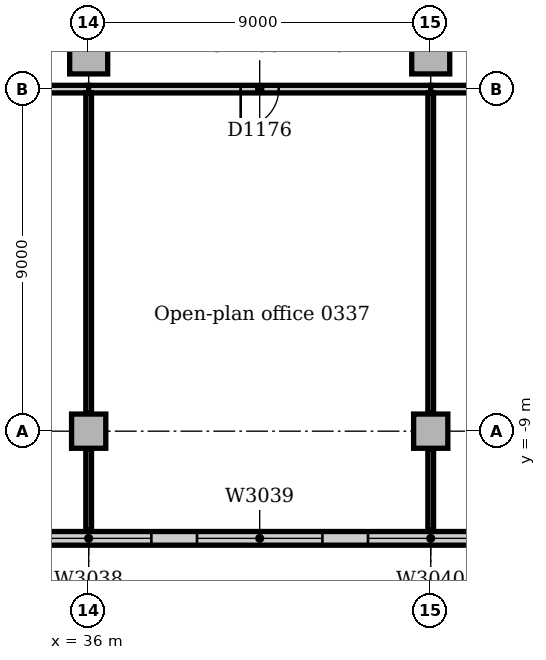
"""IFC4 building model, lengths in metres.
Left out: names, types, materials, properties, quantities, classifications, styles, units other than length and angle.
Written with IfcOpenShell. Run it as: python <this file> out.ifc"""

import sys

from ifc_helpers import new_model, si_unit, direction, frame, frame_2d, origin, origin_2d, place, context, subcontext, project, spatial, rectangle, extrude, element, fill, save


model = new_model("IFC4")
c1 = context("Model", 3, precision=1e-05, world=origin(), true_north=direction((0.0, 1.0)))
c2 = subcontext(c1, "Body", "Model", "MODEL_VIEW")
j1 = project(units=[si_unit("LENGTHUNIT", "METRE"), si_unit("PLANEANGLEUNIT", "RADIAN")], contexts=[c1])
p1 = place(None, origin())
s1 = spatial("IfcSite", under=j1, at=p1, CompositionType="ELEMENT")
p2 = place(p1, origin())
s2 = spatial("IfcBuilding", under=s1, at=p2, CompositionType="ELEMENT")
p3 = place(p2, frame((0.0, 0.0, 16.0)))
s3 = spatial("IfcBuildingStorey", under=s2, at=p3, CompositionType="ELEMENT", Elevation=16.0)
for number, where, z_axis, x_axis in (
    (1, (36.0, 0.9, 0.0), (0.0, 0.0, 1.0), (1.0, 0.0, 0.0)),
    (2, (45.0, 0.9, 0.0), (0.0, 0.0, 1.0), (1.0, 0.0, 0.0)),
):
    element("IfcColumn", number, at=place(p3, frame(where, z_axis=z_axis, x_axis=x_axis)), inside=s3, PredefinedType="COLUMN", context=c2, shape_type="SweptSolid", body=[
        extrude(rectangle(XDim=1.0, YDim=1.0, at=origin_2d()), origin(), (0.0, 0.0, 1.0), 4.7),
    ])
for number, where, z_axis, x_axis in (
    (3, (36.0, -9.0, 0.0), (0.0, 0.0, 1.0), (1.0, 0.0, 0.0)),
    (4, (45.0, -9.0, 0.0), (0.0, 0.0, 1.0), (1.0, 0.0, 0.0)),
):
    element("IfcColumn", number, at=place(p3, frame(where, z_axis=z_axis, x_axis=x_axis)), inside=s3, PredefinedType="COLUMN", context=c2, shape_type="SweptSolid", body=[
        extrude(rectangle(XDim=0.9, YDim=0.9, at=origin_2d()), origin(), (0.0, 0.0, 1.0), 4.7),
    ])
p4 = place(p3, frame((-81.0, -11.82, 0.0), z_axis=(0.0, 0.0, 1.0), x_axis=(1.0, 0.0, 0.0)))
e5 = element("IfcWall", 5, at=p4, inside=s3, PredefinedType="STANDARD", context=c2, shape_type="SweptSolid", body=[
    extrude(rectangle(XDim=144.0, YDim=0.36, at=frame_2d((72.0, 0.0))), origin(), (0.0, 0.0, 1.0), 4.7),
])
p5 = place(p4, frame((2.85, 0.0, 0.9)))
e6 = element("IfcOpeningElement", 6, at=p5, cuts=e5, PredefinedType="OPENING", context=c2, shape_type="SweptSolid", body=[
    extrude(rectangle(XDim=3.3, YDim=2.4, at=frame_2d((1.65, 1.2))), frame((0.0, 0.19, 0.0), z_axis=(0.0, -1.0, 0.0), x_axis=(1.0, 0.0, 0.0)), (0.0, 0.0, 1.0), 0.38),
])
p6 = place(p4, frame((7.35, 0.0, 0.9)))
e7 = element("IfcOpeningElement", 7, at=p6, cuts=e5, PredefinedType="OPENING", context=c2, shape_type="SweptSolid", body=[
    extrude(rectangle(XDim=3.3, YDim=2.4, at=frame_2d((1.65, 1.2))), frame((0.0, 0.19, 0.0), z_axis=(0.0, -1.0, 0.0), x_axis=(1.0, 0.0, 0.0)), (0.0, 0.0, 1.0), 0.38),
])
p7 = place(p4, frame((11.85, 0.0, 0.9)))
e8 = element("IfcOpeningElement", 8, at=p7, cuts=e5, PredefinedType="OPENING", context=c2, shape_type="SweptSolid", body=[
    extrude(rectangle(XDim=3.3, YDim=2.4, at=frame_2d((1.65, 1.2))), frame((0.0, 0.19, 0.0), z_axis=(0.0, -1.0, 0.0), x_axis=(1.0, 0.0, 0.0)), (0.0, 0.0, 1.0), 0.38),
])
p8 = place(p4, frame((16.35, 0.0, 0.9)))
e9 = element("IfcOpeningElement", 9, at=p8, cuts=e5, PredefinedType="OPENING", context=c2, shape_type="SweptSolid", body=[
    extrude(rectangle(XDim=3.3, YDim=2.4, at=frame_2d((1.65, 1.2))), frame((0.0, 0.19, 0.0), z_axis=(0.0, -1.0, 0.0), x_axis=(1.0, 0.0, 0.0)), (0.0, 0.0, 1.0), 0.38),
])
p9 = place(p4, frame((20.85, 0.0, 0.9)))
e10 = element("IfcOpeningElement", 10, at=p9, cuts=e5, PredefinedType="OPENING", context=c2, shape_type="SweptSolid", body=[
    extrude(rectangle(XDim=3.3, YDim=2.4, at=frame_2d((1.65, 1.2))), frame((0.0, 0.19, 0.0), z_axis=(0.0, -1.0, 0.0), x_axis=(1.0, 0.0, 0.0)), (0.0, 0.0, 1.0), 0.38),
])
p10 = place(p4, frame((25.35, 0.0, 0.9)))
e11 = element("IfcOpeningElement", 11, at=p10, cuts=e5, PredefinedType="OPENING", context=c2, shape_type="SweptSolid", body=[
    extrude(rectangle(XDim=3.3, YDim=2.4, at=frame_2d((1.65, 1.2))), frame((0.0, 0.19, 0.0), z_axis=(0.0, -1.0, 0.0), x_axis=(1.0, 0.0, 0.0)), (0.0, 0.0, 1.0), 0.38),
])
p11 = place(p4, frame((29.85, 0.0, 0.9)))
e12 = element("IfcOpeningElement", 12, at=p11, cuts=e5, PredefinedType="OPENING", context=c2, shape_type="SweptSolid", body=[
    extrude(rectangle(XDim=3.3, YDim=2.4, at=frame_2d((1.65, 1.2))), frame((0.0, 0.19, 0.0), z_axis=(0.0, -1.0, 0.0), x_axis=(1.0, 0.0, 0.0)), (0.0, 0.0, 1.0), 0.38),
])
p12 = place(p4, frame((34.35, 0.0, 0.9)))
e13 = element("IfcOpeningElement", 13, at=p12, cuts=e5, PredefinedType="OPENING", context=c2, shape_type="SweptSolid", body=[
    extrude(rectangle(XDim=3.3, YDim=2.4, at=frame_2d((1.65, 1.2))), frame((0.0, 0.19, 0.0), z_axis=(0.0, -1.0, 0.0), x_axis=(1.0, 0.0, 0.0)), (0.0, 0.0, 1.0), 0.38),
])
p13 = place(p4, frame((38.85, 0.0, 0.9)))
e14 = element("IfcOpeningElement", 14, at=p13, cuts=e5, PredefinedType="OPENING", context=c2, shape_type="SweptSolid", body=[
    extrude(rectangle(XDim=3.3, YDim=2.4, at=frame_2d((1.65, 1.2))), frame((0.0, 0.19, 0.0), z_axis=(0.0, -1.0, 0.0), x_axis=(1.0, 0.0, 0.0)), (0.0, 0.0, 1.0), 0.38),
])
p14 = place(p4, frame((43.35, 0.0, 0.9)))
e15 = element("IfcOpeningElement", 15, at=p14, cuts=e5, PredefinedType="OPENING", context=c2, shape_type="SweptSolid", body=[
    extrude(rectangle(XDim=3.3, YDim=2.4, at=frame_2d((1.65, 1.2))), frame((0.0, 0.19, 0.0), z_axis=(0.0, -1.0, 0.0), x_axis=(1.0, 0.0, 0.0)), (0.0, 0.0, 1.0), 0.38),
])
p15 = place(p4, frame((47.85, 0.0, 0.9)))
e16 = element("IfcOpeningElement", 16, at=p15, cuts=e5, PredefinedType="OPENING", context=c2, shape_type="SweptSolid", body=[
    extrude(rectangle(XDim=3.3, YDim=2.4, at=frame_2d((1.65, 1.2))), frame((0.0, 0.19, 0.0), z_axis=(0.0, -1.0, 0.0), x_axis=(1.0, 0.0, 0.0)), (0.0, 0.0, 1.0), 0.38),
])
p16 = place(p4, frame((52.35, 0.0, 0.9)))
e17 = element("IfcOpeningElement", 17, at=p16, cuts=e5, PredefinedType="OPENING", context=c2, shape_type="SweptSolid", body=[
    extrude(rectangle(XDim=3.3, YDim=2.4, at=frame_2d((1.65, 1.2))), frame((0.0, 0.19, 0.0), z_axis=(0.0, -1.0, 0.0), x_axis=(1.0, 0.0, 0.0)), (0.0, 0.0, 1.0), 0.38),
])
p17 = place(p4, frame((56.85, 0.0, 0.9)))
e18 = element("IfcOpeningElement", 18, at=p17, cuts=e5, PredefinedType="OPENING", context=c2, shape_type="SweptSolid", body=[
    extrude(rectangle(XDim=3.3, YDim=2.4, at=frame_2d((1.65, 1.2))), frame((0.0, 0.19, 0.0), z_axis=(0.0, -1.0, 0.0), x_axis=(1.0, 0.0, 0.0)), (0.0, 0.0, 1.0), 0.38),
])
p18 = place(p4, frame((61.35, 0.0, 0.9)))
e19 = element("IfcOpeningElement", 19, at=p18, cuts=e5, PredefinedType="OPENING", context=c2, shape_type="SweptSolid", body=[
    extrude(rectangle(XDim=3.3, YDim=2.4, at=frame_2d((1.65, 1.2))), frame((0.0, 0.19, 0.0), z_axis=(0.0, -1.0, 0.0), x_axis=(1.0, 0.0, 0.0)), (0.0, 0.0, 1.0), 0.38),
])
p19 = place(p4, frame((65.85, 0.0, 0.9)))
e20 = element("IfcOpeningElement", 20, at=p19, cuts=e5, PredefinedType="OPENING", context=c2, shape_type="SweptSolid", body=[
    extrude(rectangle(XDim=3.3, YDim=2.4, at=frame_2d((1.65, 1.2))), frame((0.0, 0.19, 0.0), z_axis=(0.0, -1.0, 0.0), x_axis=(1.0, 0.0, 0.0)), (0.0, 0.0, 1.0), 0.38),
])
p20 = place(p4, frame((70.35, 0.0, 0.9)))
e21 = element("IfcOpeningElement", 21, at=p20, cuts=e5, PredefinedType="OPENING", context=c2, shape_type="SweptSolid", body=[
    extrude(rectangle(XDim=3.3, YDim=2.4, at=frame_2d((1.65, 1.2))), frame((0.0, 0.19, 0.0), z_axis=(0.0, -1.0, 0.0), x_axis=(1.0, 0.0, 0.0)), (0.0, 0.0, 1.0), 0.38),
])
p21 = place(p4, frame((74.85, 0.0, 0.9)))
e22 = element("IfcOpeningElement", 22, at=p21, cuts=e5, PredefinedType="OPENING", context=c2, shape_type="SweptSolid", body=[
    extrude(rectangle(XDim=3.3, YDim=2.4, at=frame_2d((1.65, 1.2))), frame((0.0, 0.19, 0.0), z_axis=(0.0, -1.0, 0.0), x_axis=(1.0, 0.0, 0.0)), (0.0, 0.0, 1.0), 0.38),
])
p22 = place(p4, frame((79.35, 0.0, 0.9)))
e23 = element("IfcOpeningElement", 23, at=p22, cuts=e5, PredefinedType="OPENING", context=c2, shape_type="SweptSolid", body=[
    extrude(rectangle(XDim=3.3, YDim=2.4, at=frame_2d((1.65, 1.2))), frame((0.0, 0.19, 0.0), z_axis=(0.0, -1.0, 0.0), x_axis=(1.0, 0.0, 0.0)), (0.0, 0.0, 1.0), 0.38),
])
p23 = place(p4, frame((83.85, 0.0, 0.9)))
e24 = element("IfcOpeningElement", 24, at=p23, cuts=e5, PredefinedType="OPENING", context=c2, shape_type="SweptSolid", body=[
    extrude(rectangle(XDim=3.3, YDim=2.4, at=frame_2d((1.65, 1.2))), frame((0.0, 0.19, 0.0), z_axis=(0.0, -1.0, 0.0), x_axis=(1.0, 0.0, 0.0)), (0.0, 0.0, 1.0), 0.38),
])
p24 = place(p4, frame((88.35, 0.0, 0.9)))
e25 = element("IfcOpeningElement", 25, at=p24, cuts=e5, PredefinedType="OPENING", context=c2, shape_type="SweptSolid", body=[
    extrude(rectangle(XDim=3.3, YDim=2.4, at=frame_2d((1.65, 1.2))), frame((0.0, 0.19, 0.0), z_axis=(0.0, -1.0, 0.0), x_axis=(1.0, 0.0, 0.0)), (0.0, 0.0, 1.0), 0.38),
])
p25 = place(p4, frame((92.85, 0.0, 0.9)))
e26 = element("IfcOpeningElement", 26, at=p25, cuts=e5, PredefinedType="OPENING", context=c2, shape_type="SweptSolid", body=[
    extrude(rectangle(XDim=3.3, YDim=2.4, at=frame_2d((1.65, 1.2))), frame((0.0, 0.19, 0.0), z_axis=(0.0, -1.0, 0.0), x_axis=(1.0, 0.0, 0.0)), (0.0, 0.0, 1.0), 0.38),
])
p26 = place(p4, frame((97.35, 0.0, 0.9)))
e27 = element("IfcOpeningElement", 27, at=p26, cuts=e5, PredefinedType="OPENING", context=c2, shape_type="SweptSolid", body=[
    extrude(rectangle(XDim=3.3, YDim=2.4, at=frame_2d((1.65, 1.2))), frame((0.0, 0.19, 0.0), z_axis=(0.0, -1.0, 0.0), x_axis=(1.0, 0.0, 0.0)), (0.0, 0.0, 1.0), 0.38),
])
p27 = place(p4, frame((101.85, 0.0, 0.9)))
e28 = element("IfcOpeningElement", 28, at=p27, cuts=e5, PredefinedType="OPENING", context=c2, shape_type="SweptSolid", body=[
    extrude(rectangle(XDim=3.3, YDim=2.4, at=frame_2d((1.65, 1.2))), frame((0.0, 0.19, 0.0), z_axis=(0.0, -1.0, 0.0), x_axis=(1.0, 0.0, 0.0)), (0.0, 0.0, 1.0), 0.38),
])
p28 = place(p4, frame((106.35, 0.0, 0.9)))
e29 = element("IfcOpeningElement", 29, at=p28, cuts=e5, PredefinedType="OPENING", context=c2, shape_type="SweptSolid", body=[
    extrude(rectangle(XDim=3.3, YDim=2.4, at=frame_2d((1.65, 1.2))), frame((0.0, 0.19, 0.0), z_axis=(0.0, -1.0, 0.0), x_axis=(1.0, 0.0, 0.0)), (0.0, 0.0, 1.0), 0.38),
])
p29 = place(p4, frame((110.85, 0.0, 0.9)))
e30 = element("IfcOpeningElement", 30, at=p29, cuts=e5, PredefinedType="OPENING", context=c2, shape_type="SweptSolid", body=[
    extrude(rectangle(XDim=3.3, YDim=2.4, at=frame_2d((1.65, 1.2))), frame((0.0, 0.19, 0.0), z_axis=(0.0, -1.0, 0.0), x_axis=(1.0, 0.0, 0.0)), (0.0, 0.0, 1.0), 0.38),
])
p30 = place(p4, frame((115.35, 0.0, 0.9)))
e31 = element("IfcOpeningElement", 31, at=p30, cuts=e5, PredefinedType="OPENING", context=c2, shape_type="SweptSolid", body=[
    extrude(rectangle(XDim=3.3, YDim=2.4, at=frame_2d((1.65, 1.2))), frame((0.0, 0.19, 0.0), z_axis=(0.0, -1.0, 0.0), x_axis=(1.0, 0.0, 0.0)), (0.0, 0.0, 1.0), 0.38),
])
p31 = place(p4, frame((119.85, 0.0, 0.9)))
e32 = element("IfcOpeningElement", 32, at=p31, cuts=e5, PredefinedType="OPENING", context=c2, shape_type="SweptSolid", body=[
    extrude(rectangle(XDim=3.3, YDim=2.4, at=frame_2d((1.65, 1.2))), frame((0.0, 0.19, 0.0), z_axis=(0.0, -1.0, 0.0), x_axis=(1.0, 0.0, 0.0)), (0.0, 0.0, 1.0), 0.38),
])
p32 = place(p4, frame((124.35, 0.0, 0.9)))
e33 = element("IfcOpeningElement", 33, at=p32, cuts=e5, PredefinedType="OPENING", context=c2, shape_type="SweptSolid", body=[
    extrude(rectangle(XDim=3.3, YDim=2.4, at=frame_2d((1.65, 1.2))), frame((0.0, 0.19, 0.0), z_axis=(0.0, -1.0, 0.0), x_axis=(1.0, 0.0, 0.0)), (0.0, 0.0, 1.0), 0.38),
])
p33 = place(p4, frame((128.85, 0.0, 0.9)))
e34 = element("IfcOpeningElement", 34, at=p33, cuts=e5, PredefinedType="OPENING", context=c2, shape_type="SweptSolid", body=[
    extrude(rectangle(XDim=3.3, YDim=2.4, at=frame_2d((1.65, 1.2))), frame((0.0, 0.19, 0.0), z_axis=(0.0, -1.0, 0.0), x_axis=(1.0, 0.0, 0.0)), (0.0, 0.0, 1.0), 0.38),
])
p34 = place(p4, frame((133.35, 0.0, 0.9)))
e35 = element("IfcOpeningElement", 35, at=p34, cuts=e5, PredefinedType="OPENING", context=c2, shape_type="SweptSolid", body=[
    extrude(rectangle(XDim=3.3, YDim=2.4, at=frame_2d((1.65, 1.2))), frame((0.0, 0.19, 0.0), z_axis=(0.0, -1.0, 0.0), x_axis=(1.0, 0.0, 0.0)), (0.0, 0.0, 1.0), 0.38),
])
p35 = place(p4, frame((137.85, 0.0, 0.9)))
e36 = element("IfcOpeningElement", 36, at=p35, cuts=e5, PredefinedType="OPENING", context=c2, shape_type="SweptSolid", body=[
    extrude(rectangle(XDim=3.3, YDim=2.4, at=frame_2d((1.65, 1.2))), frame((0.0, 0.19, 0.0), z_axis=(0.0, -1.0, 0.0), x_axis=(1.0, 0.0, 0.0)), (0.0, 0.0, 1.0), 0.38),
])
p36 = place(p3, frame((27.0, 0.0, 0.0), z_axis=(0.0, 0.0, 1.0), x_axis=(1.0, 0.0, 0.0)))
e37 = element("IfcWall", 37, at=p36, inside=s3, PredefinedType="PARTITIONING", context=c2, shape_type="SweptSolid", body=[
    extrude(rectangle(XDim=9.0, YDim=0.2, at=frame_2d((4.5, 0.0))), origin(), (0.0, 0.0, 1.0), 4.7),
])
p37 = place(p36, frame((4.0, 0.0, 0.0)))
e38 = element("IfcOpeningElement", 38, at=p37, cuts=e37, PredefinedType="OPENING", context=c2, shape_type="SweptSolid", body=[
    extrude(rectangle(XDim=1.0, YDim=2.1, at=frame_2d((0.5, 1.05))), frame((0.0, 0.11, 0.0), z_axis=(0.0, -1.0, 0.0), x_axis=(1.0, 0.0, 0.0)), (0.0, 0.0, 1.0), 0.22),
])
p38 = place(p3, frame((36.0, 0.0, 0.0), z_axis=(0.0, 0.0, 1.0), x_axis=(1.0, 0.0, 0.0)))
e39 = element("IfcWall", 39, at=p38, inside=s3, PredefinedType="PARTITIONING", context=c2, shape_type="SweptSolid", body=[
    extrude(rectangle(XDim=9.0, YDim=0.2, at=frame_2d((4.5, 0.0))), origin(), (0.0, 0.0, 1.0), 4.7),
])
p39 = place(p38, frame((4.0, 0.0, 0.0)))
e40 = element("IfcOpeningElement", 40, at=p39, cuts=e39, PredefinedType="OPENING", context=c2, shape_type="SweptSolid", body=[
    extrude(rectangle(XDim=1.0, YDim=2.1, at=frame_2d((0.5, 1.05))), frame((0.0, 0.11, 0.0), z_axis=(0.0, -1.0, 0.0), x_axis=(1.0, 0.0, 0.0)), (0.0, 0.0, 1.0), 0.22),
])
p40 = place(p3, frame((45.0, 0.0, 0.0), z_axis=(0.0, 0.0, 1.0), x_axis=(1.0, 0.0, 0.0)))
e41 = element("IfcWall", 41, at=p40, inside=s3, PredefinedType="PARTITIONING", context=c2, shape_type="SweptSolid", body=[
    extrude(rectangle(XDim=9.0, YDim=0.2, at=frame_2d((4.5, 0.0))), origin(), (0.0, 0.0, 1.0), 4.7),
])
p41 = place(p40, frame((4.6, 0.0, 0.0)))
e42 = element("IfcOpeningElement", 42, at=p41, cuts=e41, PredefinedType="OPENING", context=c2, shape_type="SweptSolid", body=[
    extrude(rectangle(XDim=1.0, YDim=2.1, at=frame_2d((0.5, 1.05))), frame((0.0, 0.11, 0.0), z_axis=(0.0, -1.0, 0.0), x_axis=(1.0, 0.0, 0.0)), (0.0, 0.0, 1.0), 0.22),
])
p42 = place(p3, frame((36.0, -11.6, 0.0), z_axis=(0.0, 0.0, 1.0), x_axis=(0.0, 1.0, 0.0)))
e43 = element("IfcWall", 43, at=p42, inside=s3, PredefinedType="PARTITIONING", context=c2, shape_type="SweptSolid", body=[
    extrude(rectangle(XDim=2.13, YDim=0.15, at=frame_2d((1.065, 0.0))), origin(), (0.0, 0.0, 1.0), 4.7),
])
p43 = place(p3, frame((36.0, -8.53, 0.0), z_axis=(0.0, 0.0, 1.0), x_axis=(0.0, 1.0, 0.0)))
e44 = element("IfcWall", 44, at=p43, inside=s3, PredefinedType="PARTITIONING", context=c2, shape_type="SweptSolid", body=[
    extrude(rectangle(XDim=8.43, YDim=0.15, at=frame_2d((4.215, 0.0))), origin(), (0.0, 0.0, 1.0), 4.7),
])
p44 = place(p3, frame((45.0, -11.6, 0.0), z_axis=(0.0, 0.0, 1.0), x_axis=(0.0, 1.0, 0.0)))
e45 = element("IfcWall", 45, at=p44, inside=s3, PredefinedType="PARTITIONING", context=c2, shape_type="SweptSolid", body=[
    extrude(rectangle(XDim=2.13, YDim=0.15, at=frame_2d((1.065, 0.0))), origin(), (0.0, 0.0, 1.0), 4.7),
])
p45 = place(p3, frame((45.0, -8.53, 0.0), z_axis=(0.0, 0.0, 1.0), x_axis=(0.0, 1.0, 0.0)))
e46 = element("IfcWall", 46, at=p45, inside=s3, PredefinedType="PARTITIONING", context=c2, shape_type="SweptSolid", body=[
    extrude(rectangle(XDim=8.43, YDim=0.15, at=frame_2d((4.215, 0.0))), origin(), (0.0, 0.0, 1.0), 4.7),
])
p46 = place(p30, origin())
e47 = element("IfcWindow", 47, at=p46, inside=s3, PartitioningType="SINGLE_PANEL", PredefinedType="WINDOW", context=c2, shape_type="SweptSolid", body=[
    extrude(rectangle(XDim=3.3, YDim=2.4, at=frame_2d((1.65, 1.2))), frame((0.0, 0.13, 0.0), z_axis=(0.0, -1.0, 0.0), x_axis=(1.0, 0.0, 0.0)), (0.0, 0.0, 1.0), 0.06),
])
fill(e31, e47)
p47 = place(p31, origin())
e48 = element("IfcWindow", 48, at=p47, inside=s3, PartitioningType="SINGLE_PANEL", PredefinedType="WINDOW", context=c2, shape_type="SweptSolid", body=[
    extrude(rectangle(XDim=3.3, YDim=2.4, at=frame_2d((1.65, 1.2))), frame((0.0, 0.13, 0.0), z_axis=(0.0, -1.0, 0.0), x_axis=(1.0, 0.0, 0.0)), (0.0, 0.0, 1.0), 0.06),
])
fill(e32, e48)
p48 = place(p32, origin())
e49 = element("IfcWindow", 49, at=p48, inside=s3, PartitioningType="SINGLE_PANEL", PredefinedType="WINDOW", context=c2, shape_type="SweptSolid", body=[
    extrude(rectangle(XDim=3.3, YDim=2.4, at=frame_2d((1.65, 1.2))), frame((0.0, 0.13, 0.0), z_axis=(0.0, -1.0, 0.0), x_axis=(1.0, 0.0, 0.0)), (0.0, 0.0, 1.0), 0.06),
])
fill(e33, e49)
p49 = place(p39, frame((1.0, 0.0, 0.0), z_axis=(0.0, 0.0, 1.0), x_axis=(-1.0, 0.0, 0.0)))
e50 = element("IfcDoor", 50, at=p49, inside=s3, OperationType="SINGLE_SWING_RIGHT", PredefinedType="DOOR", context=c2, shape_type="SweptSolid", body=[
    extrude(rectangle(XDim=1.0, YDim=2.1, at=frame_2d((0.5, 1.05))), frame((0.0, 0.025, 0.0), z_axis=(0.0, -1.0, 0.0), x_axis=(1.0, 0.0, 0.0)), (0.0, 0.0, 1.0), 0.05),
])
fill(e40, e50)
save(model, sys.argv[1])
